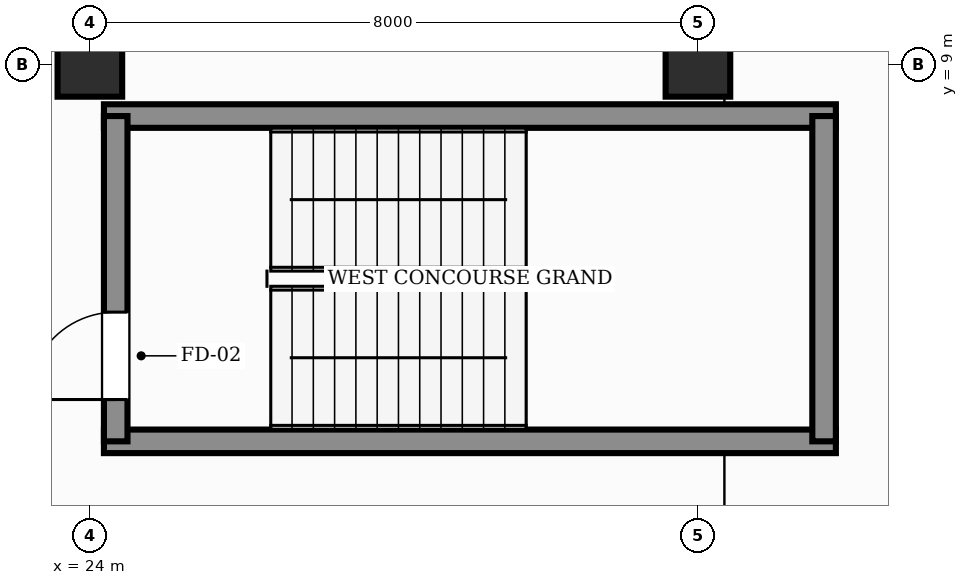
"""IFC4 building model, lengths in metres.
Left out: names, types, materials, properties, quantities, classifications, styles, units other than length and angle.
Written with IfcOpenShell. Run it as: python <this file> out.ifc"""

import sys

from ifc_helpers import new_model, si_unit, direction, frame, frame_2d, origin, origin_2d, place, context, subcontext, project, spatial, rectangle, extrude, element, fill, save


model = new_model("IFC4")
c1 = context("Model", 3, precision=1e-05, world=origin(), true_north=direction((0.0, 1.0)))
c2 = subcontext(c1, "Body", "Model", "MODEL_VIEW")
j1 = project(units=[si_unit("LENGTHUNIT", "METRE"), si_unit("PLANEANGLEUNIT", "RADIAN")], contexts=[c1])
p1 = place(None, origin())
s1 = spatial("IfcSite", under=j1, at=p1, CompositionType="ELEMENT")
p2 = place(p1, origin())
s2 = spatial("IfcBuilding", under=s1, at=p2, CompositionType="ELEMENT")
p3 = place(p2, frame((0.0, 0.0, -4.8)))
s3 = spatial("IfcBuildingStorey", under=s2, at=p3, CompositionType="ELEMENT", Elevation=-4.8)
for number, where, z_axis, x_axis in (
    (1, (24.0, 9.0, 0.0), (0.0, 0.0, 1.0), (1.0, 0.0, 0.0)),
    (2, (32.0, 9.0, 0.0), (0.0, 0.0, 1.0), (1.0, 0.0, 0.0)),
):
    element("IfcColumn", number, at=place(p3, frame(where, z_axis=z_axis, x_axis=x_axis)), inside=s3, PredefinedType="COLUMN", context=c2, shape_type="SweptSolid", body=[
        extrude(rectangle(XDim=0.85, YDim=0.85, at=origin_2d()), origin(), (0.0, 0.0, 1.0), 4.8),
    ])
for number, where, z_axis, x_axis in (
    (3, (24.185, 4.04, 0.0), (0.0, 0.0, 1.0), (1.0, 0.0, 0.0)),
    (4, (24.185, 8.32, 0.0), (0.0, 0.0, 1.0), (1.0, 0.0, 0.0)),
):
    element("IfcWall", number, at=place(p3, frame(where, z_axis=z_axis, x_axis=x_axis)), inside=s3, PredefinedType="SHEAR", context=c2, shape_type="SweptSolid", body=[
        extrude(rectangle(XDim=9.63, YDim=0.31, at=frame_2d((4.815, 0.0))), origin(), (0.0, 0.0, 1.0), 4.8),
    ])
p4 = place(p3, frame((24.34, 4.04, 0.0), z_axis=(0.0, 0.0, 1.0), x_axis=(0.0, 1.0, 0.0)))
e5 = element("IfcWall", 5, at=p4, inside=s3, PredefinedType="SHEAR", context=c2, shape_type="SweptSolid", body=[
    extrude(rectangle(XDim=4.28, YDim=0.31, at=frame_2d((2.14, 0.0))), origin(), (0.0, 0.0, 1.0), 4.8),
])
p5 = place(p4, frame((0.55, 0.0, 0.0)))
e6 = element("IfcOpeningElement", 6, at=p5, cuts=e5, PredefinedType="OPENING", context=c2, shape_type="SweptSolid", body=[
    extrude(rectangle(XDim=1.15, YDim=2.2, at=frame_2d((0.575, 1.1))), frame((0.0, 0.165, 0.0), z_axis=(0.0, -1.0, 0.0), x_axis=(1.0, 0.0, 0.0)), (0.0, 0.0, 1.0), 0.33),
])
p6 = place(p3, frame((33.66, 4.04, 0.0), z_axis=(0.0, 0.0, 1.0), x_axis=(0.0, 1.0, 0.0)))
e7 = element("IfcWall", 7, at=p6, inside=s3, PredefinedType="SHEAR", context=c2, shape_type="SweptSolid", body=[
    extrude(rectangle(XDim=4.28, YDim=0.31, at=frame_2d((2.14, 0.0))), origin(), (0.0, 0.0, 1.0), 4.8),
])
p7 = place(p5, origin())
e8 = element("IfcDoor", 8, at=p7, inside=s3, OperationType="SINGLE_SWING_LEFT", PredefinedType="DOOR", context=c2, shape_type="SweptSolid", body=[
    extrude(rectangle(XDim=1.15, YDim=2.2, at=frame_2d((0.575, 1.1))), frame((0.0, 0.025, 0.0), z_axis=(0.0, -1.0, 0.0), x_axis=(1.0, 0.0, 0.0)), (0.0, 0.0, 1.0), 0.05),
])
fill(e6, e8)
save(model, sys.argv[1])
